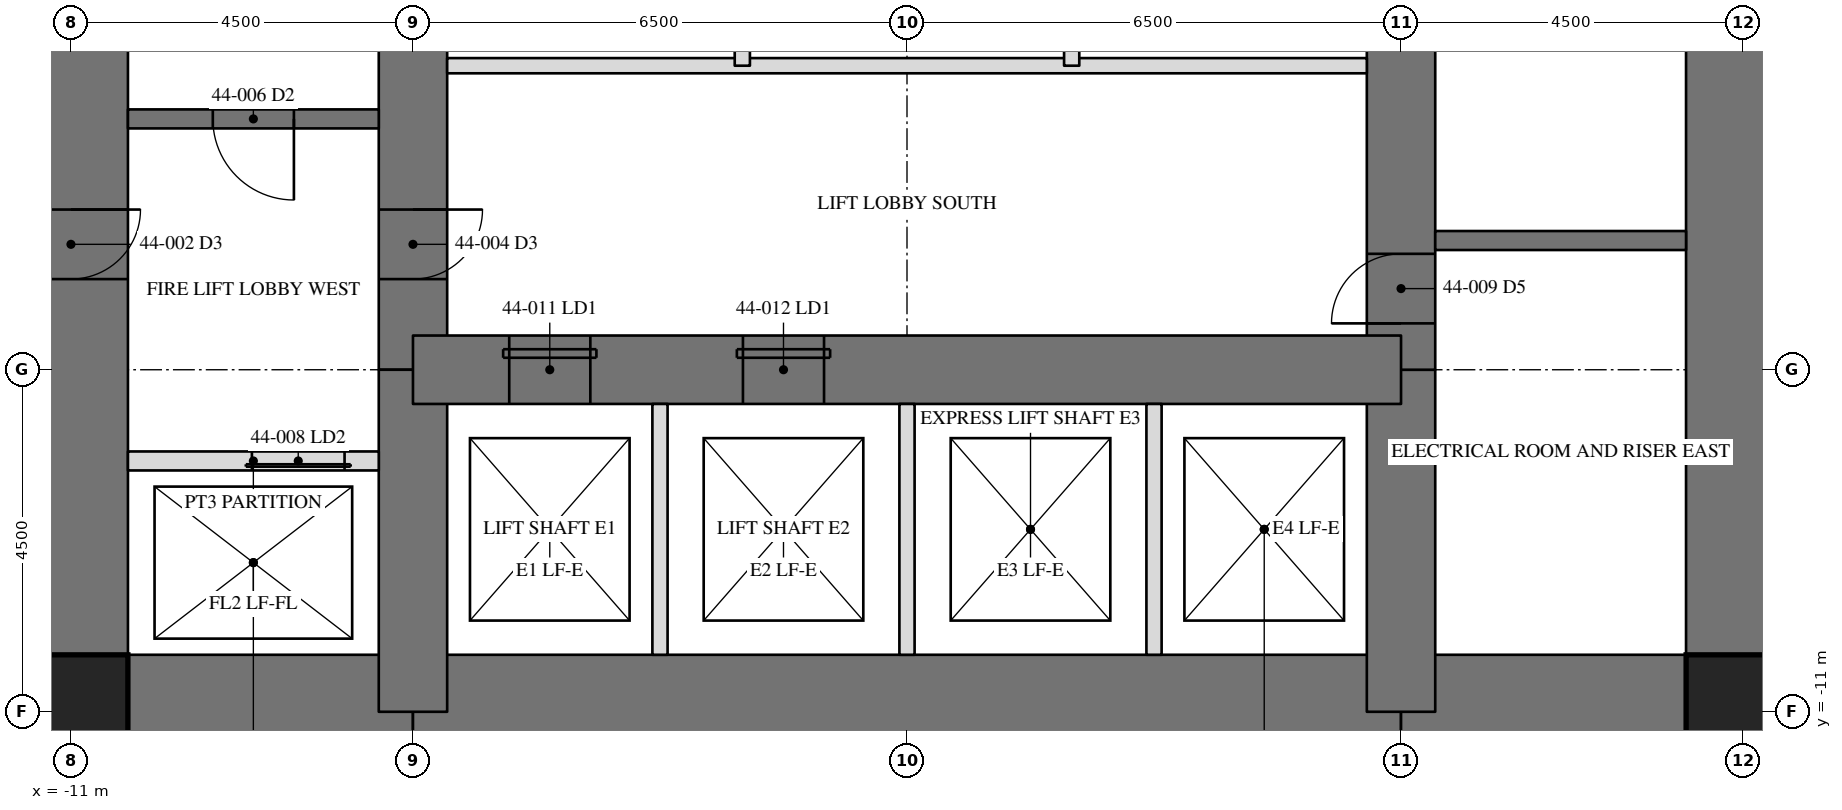
"""IFC4 building model, lengths in metres.
Left out: names, types, materials, properties, quantities, classifications, styles, units other than length and angle.
Written with IfcOpenShell. Run it as: python <this file> out.ifc"""

import sys

from ifc_helpers import new_model, si_unit, direction, frame, frame_2d, origin, origin_2d, place, context, subcontext, project, spatial, rectangle, hollow_rectangle, extrude, element, fill, save


model = new_model("IFC4")
c1 = context("Model", 3, precision=1e-05, world=origin(), true_north=direction((0.0, 1.0)))
c2 = subcontext(c1, "Body", "Model", "MODEL_VIEW")
j1 = project(units=[si_unit("LENGTHUNIT", "METRE"), si_unit("PLANEANGLEUNIT", "RADIAN")], contexts=[c1])
p1 = place(None, origin())
s1 = spatial("IfcSite", under=j1, at=p1, CompositionType="ELEMENT")
p2 = place(p1, origin())
s2 = spatial("IfcBuilding", under=s1, at=p2, CompositionType="ELEMENT")
p3 = place(p2, frame((0.0, 0.0, 190.7)))
s3 = spatial("IfcBuildingStorey", under=s2, at=p3, CompositionType="ELEMENT", Elevation=190.7)
p4 = place(p3, frame((11.0, -11.0, 0.0), z_axis=(0.0, 0.0, 1.0), x_axis=(0.0, 1.0, 0.0)))
e1 = element("IfcWall", 1, at=p4, inside=s3, PredefinedType="SHEAR", context=c2, shape_type="SweptSolid", body=[
    extrude(rectangle(XDim=22.0, YDim=1.5, at=frame_2d((11.0, 0.0))), origin(), (0.0, 0.0, 1.0), 3.5),
])
p5 = place(p4, frame((15.393, 0.0, 0.0)))
e2 = element("IfcOpeningElement", 2, at=p5, cuts=e1, PredefinedType="OPENING", context=c2, shape_type="SweptSolid", body=[
    extrude(rectangle(XDim=0.915, YDim=2.134, at=frame_2d((0.458, 1.067))), frame((0.0, 0.76, 0.0), z_axis=(0.0, -1.0, 0.0), x_axis=(1.0, 0.0, 0.0)), (0.0, 0.0, 1.0), 1.52),
])
p6 = place(p3, frame((-11.0, 11.0, 0.0), z_axis=(0.0, 0.0, 1.0), x_axis=(0.0, -1.0, 0.0)))
e3 = element("IfcWall", 3, at=p6, inside=s3, PredefinedType="SHEAR", context=c2, shape_type="SweptSolid", body=[
    extrude(rectangle(XDim=22.0, YDim=1.5, at=frame_2d((11.0, 0.0))), origin(), (0.0, 0.0, 1.0), 3.5),
])
p7 = place(p6, frame((15.393, 0.0, 0.0)))
e4 = element("IfcOpeningElement", 4, at=p7, cuts=e3, PredefinedType="OPENING", context=c2, shape_type="SweptSolid", body=[
    extrude(rectangle(XDim=0.915, YDim=2.134, at=frame_2d((0.458, 1.067))), frame((0.0, 0.76, 0.0), z_axis=(0.0, -1.0, 0.0), x_axis=(1.0, 0.0, 0.0)), (0.0, 0.0, 1.0), 1.52),
])
p8 = place(p3, frame((-11.0, -11.0, 0.0), z_axis=(0.0, 0.0, 1.0), x_axis=(1.0, 0.0, 0.0)))
e5 = element("IfcWall", 5, at=p8, inside=s3, PredefinedType="SHEAR", context=c2, shape_type="SweptSolid", body=[
    extrude(rectangle(XDim=4.5, YDim=1.5, at=frame_2d((2.25, 0.0))), origin(), (0.0, 0.0, 1.0), 3.5),
])
p9 = place(p3, frame((-6.5, -11.0, 0.0), z_axis=(0.0, 0.0, 1.0), x_axis=(1.0, 0.0, 0.0)))
e6 = element("IfcWall", 6, at=p9, inside=s3, PredefinedType="SHEAR", context=c2, shape_type="SweptSolid", body=[
    extrude(rectangle(XDim=13.0, YDim=1.5, at=frame_2d((6.5, 0.0))), origin(), (0.0, 0.0, 1.0), 3.5),
])
p10 = place(p3, frame((6.5, -11.0, 0.0), z_axis=(0.0, 0.0, 1.0), x_axis=(1.0, 0.0, 0.0)))
e7 = element("IfcWall", 7, at=p10, inside=s3, PredefinedType="SHEAR", context=c2, shape_type="SweptSolid", body=[
    extrude(rectangle(XDim=4.5, YDim=1.5, at=frame_2d((2.25, 0.0))), origin(), (0.0, 0.0, 1.0), 3.5),
])
p11 = place(p3, frame((6.5, -11.0, 0.0), z_axis=(0.0, 0.0, 1.0), x_axis=(0.0, 1.0, 0.0)))
e8 = element("IfcWall", 8, at=p11, inside=s3, PredefinedType="SHEAR", context=c2, shape_type="SweptSolid", body=[
    extrude(rectangle(XDim=4.5, YDim=0.9, at=frame_2d((2.25, 0.0))), origin(), (0.0, 0.0, 1.0), 3.5),
])
p12 = place(p3, frame((6.5, -6.5, 0.0), z_axis=(0.0, 0.0, 1.0), x_axis=(0.0, 1.0, 0.0)))
e9 = element("IfcWall", 9, at=p12, inside=s3, PredefinedType="SHEAR", context=c2, shape_type="SweptSolid", body=[
    extrude(rectangle(XDim=13.0, YDim=0.9, at=frame_2d((6.5, 0.0))), origin(), (0.0, 0.0, 1.0), 3.5),
])
p13 = place(p12, frame((10.893, 0.0, 0.0)))
e10 = element("IfcOpeningElement", 10, at=p13, cuts=e9, PredefinedType="OPENING", context=c2, shape_type="SweptSolid", body=[
    extrude(rectangle(XDim=0.915, YDim=2.134, at=frame_2d((0.458, 1.067))), frame((0.0, 0.46, 0.0), z_axis=(0.0, -1.0, 0.0), x_axis=(1.0, 0.0, 0.0)), (0.0, 0.0, 1.0), 0.92),
])
p14 = place(p12, frame((0.61, 0.0, 0.0)))
e11 = element("IfcOpeningElement", 11, at=p14, cuts=e9, PredefinedType="OPENING", context=c2, shape_type="SweptSolid", body=[
    extrude(rectangle(XDim=0.915, YDim=2.134, at=frame_2d((0.458, 1.067))), frame((0.0, 0.46, 0.0), z_axis=(0.0, -1.0, 0.0), x_axis=(1.0, 0.0, 0.0)), (0.0, 0.0, 1.0), 0.92),
])
p15 = place(p3, frame((-6.5, 6.5, 0.0), z_axis=(0.0, 0.0, 1.0), x_axis=(0.0, -1.0, 0.0)))
e12 = element("IfcWall", 12, at=p15, inside=s3, PredefinedType="SHEAR", context=c2, shape_type="SweptSolid", body=[
    extrude(rectangle(XDim=13.0, YDim=0.9, at=frame_2d((6.5, 0.0))), origin(), (0.0, 0.0, 1.0), 3.5),
])
p16 = place(p15, frame((10.893, 0.0, 0.0)))
e13 = element("IfcOpeningElement", 13, at=p16, cuts=e12, PredefinedType="OPENING", context=c2, shape_type="SweptSolid", body=[
    extrude(rectangle(XDim=0.915, YDim=2.134, at=frame_2d((0.458, 1.067))), frame((0.0, 0.46, 0.0), z_axis=(0.0, -1.0, 0.0), x_axis=(1.0, 0.0, 0.0)), (0.0, 0.0, 1.0), 0.92),
])
p17 = place(p15, frame((0.61, 0.0, 0.0)))
e14 = element("IfcOpeningElement", 14, at=p17, cuts=e12, PredefinedType="OPENING", context=c2, shape_type="SweptSolid", body=[
    extrude(rectangle(XDim=0.915, YDim=2.134, at=frame_2d((0.458, 1.067))), frame((0.0, 0.46, 0.0), z_axis=(0.0, -1.0, 0.0), x_axis=(1.0, 0.0, 0.0)), (0.0, 0.0, 1.0), 0.92),
])
p18 = place(p3, frame((-6.5, -6.5, 0.0), z_axis=(0.0, 0.0, 1.0), x_axis=(0.0, -1.0, 0.0)))
e15 = element("IfcWall", 15, at=p18, inside=s3, PredefinedType="SHEAR", context=c2, shape_type="SweptSolid", body=[
    extrude(rectangle(XDim=4.5, YDim=0.9, at=frame_2d((2.25, 0.0))), origin(), (0.0, 0.0, 1.0), 3.5),
])
p19 = place(p3, frame((-6.5, -6.5, 0.0), z_axis=(0.0, 0.0, 1.0), x_axis=(1.0, 0.0, 0.0)))
e16 = element("IfcWall", 16, at=p19, inside=s3, PredefinedType="SHEAR", context=c2, shape_type="SweptSolid", body=[
    extrude(rectangle(XDim=13.0, YDim=0.9, at=frame_2d((6.5, 0.0))), origin(), (0.0, 0.0, 1.0), 3.5),
])
p20 = place(p19, frame((1.267, 0.0, 0.0)))
e17 = element("IfcOpeningElement", 17, at=p20, cuts=e16, PredefinedType="OPENING", context=c2, shape_type="SweptSolid", body=[
    extrude(rectangle(XDim=1.067, YDim=2.134, at=frame_2d((0.533, 1.067))), frame((0.0, 0.46, 0.0), z_axis=(0.0, -1.0, 0.0), x_axis=(1.0, 0.0, 0.0)), (0.0, 0.0, 1.0), 0.92),
])
p21 = place(p19, frame((4.342, 0.0, 0.0)))
e18 = element("IfcOpeningElement", 18, at=p21, cuts=e16, PredefinedType="OPENING", context=c2, shape_type="SweptSolid", body=[
    extrude(rectangle(XDim=1.067, YDim=2.134, at=frame_2d((0.533, 1.067))), frame((0.0, 0.46, 0.0), z_axis=(0.0, -1.0, 0.0), x_axis=(1.0, 0.0, 0.0)), (0.0, 0.0, 1.0), 0.92),
])
for number, where, z_axis, x_axis in (
    (19, (-11.0, -11.0, 0.0), (0.0, 0.0, 1.0), (1.0, 0.0, 0.0)),
    (20, (11.0, -11.0, 0.0), (0.0, 0.0, 1.0), (1.0, 0.0, 0.0)),
):
    element("IfcColumn", number, at=place(p3, frame(where, z_axis=z_axis, x_axis=x_axis)), inside=s3, PredefinedType="COLUMN", context=c2, shape_type="SweptSolid", body=[
        extrude(hollow_rectangle(XDim=1.499, YDim=1.499, WallThickness=0.102, at=origin_2d()), origin(), (0.0, 0.0, 1.0), 3.5),
    ])
p22 = place(p3, frame((6.95, -4.8, 0.0), z_axis=(0.0, 0.0, 1.0), x_axis=(1.0, 0.0, 0.0)))
e21 = element("IfcWall", 21, at=p22, inside=s3, PredefinedType="SOLIDWALL", context=c2, shape_type="SweptSolid", body=[
    extrude(rectangle(XDim=3.3, YDim=0.25, at=frame_2d((1.65, 0.0))), origin(), (0.0, 0.0, 1.0), 3.31),
])
p23 = place(p3, frame((-6.95, -3.2, 0.0), z_axis=(0.0, 0.0, 1.0), x_axis=(-1.0, 0.0, 0.0)))
e22 = element("IfcWall", 22, at=p23, inside=s3, PredefinedType="SOLIDWALL", context=c2, shape_type="SweptSolid", body=[
    extrude(rectangle(XDim=3.3, YDim=0.25, at=frame_2d((1.65, 0.0))), origin(), (0.0, 0.0, 1.0), 3.31),
])
p24 = place(p23, frame((1.116, 0.0, 0.0)))
e23 = element("IfcOpeningElement", 23, at=p24, cuts=e22, PredefinedType="OPENING", context=c2, shape_type="SweptSolid", body=[
    extrude(rectangle(XDim=1.067, YDim=2.134, at=frame_2d((0.533, 1.067))), frame((0.0, 0.135, 0.0), z_axis=(0.0, -1.0, 0.0), x_axis=(1.0, 0.0, 0.0)), (0.0, 0.0, 1.0), 0.27),
])
p25 = place(p3, frame((-6.95, -7.7, 0.0), z_axis=(0.0, 0.0, 1.0), x_axis=(-1.0, 0.0, 0.0)))
e24 = element("IfcWall", 24, at=p25, inside=s3, PredefinedType="PARTITIONING", context=c2, shape_type="SweptSolid", body=[
    extrude(rectangle(XDim=3.3, YDim=0.25, at=frame_2d((1.65, 0.0))), origin(), (0.0, 0.0, 1.0), 3.31),
])
p26 = place(p25, frame((0.45, 0.0, 0.0)))
e25 = element("IfcOpeningElement", 25, at=p26, cuts=e24, PredefinedType="OPENING", context=c2, shape_type="SweptSolid", body=[
    extrude(rectangle(XDim=1.219, YDim=2.134, at=frame_2d((0.609, 1.067))), frame((0.0, 0.135, 0.0), z_axis=(0.0, -1.0, 0.0), x_axis=(1.0, 0.0, 0.0)), (0.0, 0.0, 1.0), 0.27),
])
p27 = place(p3, frame((6.05, -2.5, 0.0), z_axis=(0.0, 0.0, 1.0), x_axis=(-1.0, 0.0, 0.0)))
e26 = element("IfcWall", 26, at=p27, inside=s3, PredefinedType="PARTITIONING", context=c2, shape_type="SweptSolid", body=[
    extrude(rectangle(XDim=12.1, YDim=0.2, at=frame_2d((6.05, 0.0))), origin(), (0.0, 0.0, 1.0), 3.31),
])
for number, where, z_axis, x_axis in (
    (27, (-3.25, -10.25, 0.0), (0.0, 0.0, 1.0), (0.0, 1.0, 0.0)),
    (28, (0.0, -10.25, 0.0), (0.0, 0.0, 1.0), (0.0, 1.0, 0.0)),
    (29, (3.25, -10.25, 0.0), (0.0, 0.0, 1.0), (0.0, 1.0, 0.0)),
):
    element("IfcWall", number, at=place(p3, frame(where, z_axis=z_axis, x_axis=x_axis)), inside=s3, PredefinedType="PARTITIONING", context=c2, shape_type="SweptSolid", body=[
        extrude(rectangle(XDim=3.3, YDim=0.2, at=frame_2d((1.65, 0.0))), origin(), (0.0, 0.0, 1.0), 3.31),
    ])
for number, where, z_axis, x_axis in (
    (30, (-2.167, -2.5, 0.0), (0.0, 0.0, 1.0), (0.0, 1.0, 0.0)),
    (31, (2.167, -2.5, 0.0), (0.0, 0.0, 1.0), (0.0, 1.0, 0.0)),
):
    element("IfcWall", number, at=place(p3, frame(where, z_axis=z_axis, x_axis=x_axis)), inside=s3, PredefinedType="PARTITIONING", context=c2, shape_type="SweptSolid", body=[
        extrude(rectangle(XDim=5.0, YDim=0.2, at=frame_2d((2.5, 0.0))), origin(), (0.0, 0.0, 1.0), 3.31),
    ])
p28 = place(p16, origin())
e32 = element("IfcDoor", 32, at=p28, inside=s3, OperationType="SINGLE_SWING_RIGHT", PredefinedType="DOOR", context=c2, shape_type="SweptSolid", body=[
    extrude(rectangle(XDim=0.915, YDim=2.134, at=frame_2d((0.458, 1.067))), frame((0.0, -0.375, 0.0), z_axis=(0.0, -1.0, 0.0), x_axis=(1.0, 0.0, 0.0)), (0.0, 0.0, 1.0), 0.05),
])
fill(e13, e32)
p29 = place(p24, origin())
e33 = element("IfcDoor", 33, at=p29, inside=s3, OperationType="SINGLE_SWING_LEFT", PredefinedType="DOOR", context=c2, shape_type="SweptSolid", body=[
    extrude(rectangle(XDim=1.067, YDim=2.134, at=frame_2d((0.533, 1.067))), frame((0.0, 0.025, 0.0), z_axis=(0.0, -1.0, 0.0), x_axis=(1.0, 0.0, 0.0)), (0.0, 0.0, 1.0), 0.05),
])
fill(e23, e33)
p30 = place(p26, origin())
e34 = element("IfcDoor", 34, at=p30, inside=s3, OperationType="SLIDING_TO_LEFT", PredefinedType="DOOR", context=c2, shape_type="SweptSolid", body=[
    extrude(rectangle(XDim=1.219, YDim=2.134, at=frame_2d((0.609, 1.067))), frame((0.0, 0.025, 0.0), z_axis=(0.0, -1.0, 0.0), x_axis=(1.0, 0.0, 0.0)), (0.0, 0.0, 1.0), 0.05),
])
fill(e25, e34)
p31 = place(p14, origin())
e35 = element("IfcDoor", 35, at=p31, inside=s3, OperationType="SINGLE_SWING_RIGHT", PredefinedType="DOOR", context=c2, shape_type="SweptSolid", body=[
    extrude(rectangle(XDim=0.915, YDim=2.134, at=frame_2d((0.458, 1.067))), frame((0.0, -0.375, 0.0), z_axis=(0.0, -1.0, 0.0), x_axis=(1.0, 0.0, 0.0)), (0.0, 0.0, 1.0), 0.05),
])
fill(e11, e35)
p32 = place(p20, origin())
e36 = element("IfcDoor", 36, at=p32, inside=s3, OperationType="SLIDING_TO_LEFT", PredefinedType="DOOR", context=c2, shape_type="SweptSolid", body=[
    extrude(rectangle(XDim=1.067, YDim=2.134, at=frame_2d((0.533, 1.067))), frame((0.0, -0.375, 0.0), z_axis=(0.0, -1.0, 0.0), x_axis=(1.0, 0.0, 0.0)), (0.0, 0.0, 1.0), 0.05),
])
fill(e17, e36)
p33 = place(p21, origin())
e37 = element("IfcDoor", 37, at=p33, inside=s3, OperationType="SLIDING_TO_LEFT", PredefinedType="DOOR", context=c2, shape_type="SweptSolid", body=[
    extrude(rectangle(XDim=1.067, YDim=2.134, at=frame_2d((0.533, 1.067))), frame((0.0, -0.375, 0.0), z_axis=(0.0, -1.0, 0.0), x_axis=(1.0, 0.0, 0.0)), (0.0, 0.0, 1.0), 0.05),
])
fill(e18, e37)
save(model, sys.argv[1])
